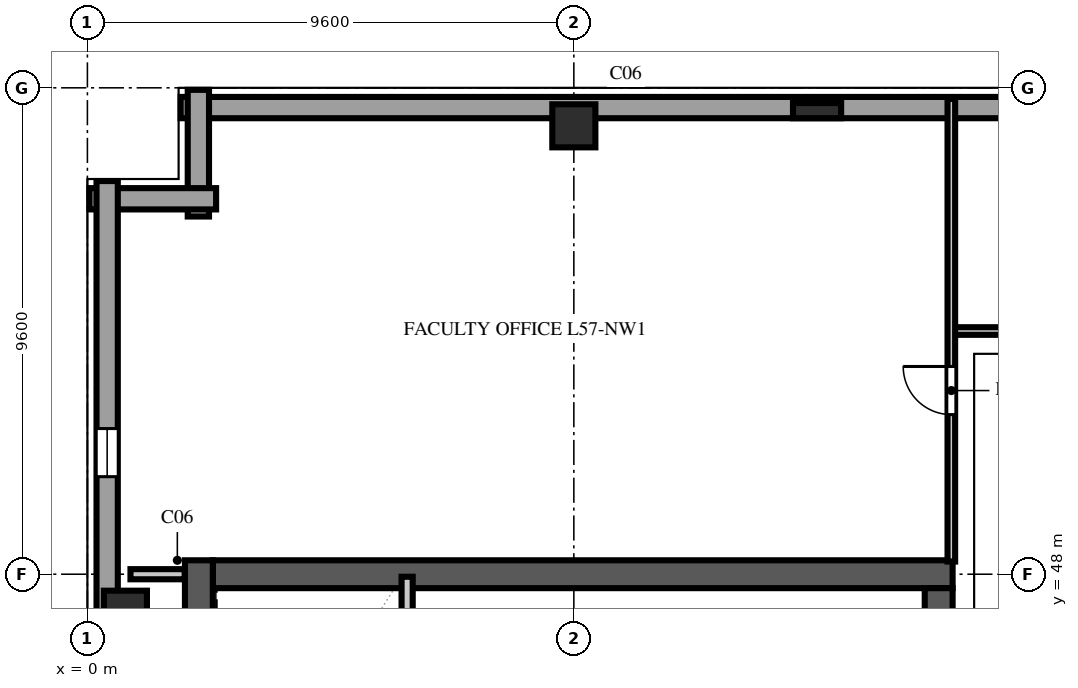
"""IFC4 building model, lengths in metres.
Left out: names, types, materials, properties, quantities, classifications, styles, units other than length and angle.
Written with IfcOpenShell. Run it as: python <this file> out.ifc"""

import sys

from ifc_helpers import new_model, si_unit, direction, frame, frame_2d, origin, origin_2d, place, context, subcontext, project, spatial, rectangle, extrude, element, fill, save


model = new_model("IFC4")
c1 = context("Model", 3, precision=1e-05, world=origin(), true_north=direction((0.0, 1.0)))
c2 = subcontext(c1, "Body", "Model", "MODEL_VIEW")
j1 = project(units=[si_unit("LENGTHUNIT", "METRE"), si_unit("PLANEANGLEUNIT", "RADIAN")], contexts=[c1])
p1 = place(None, origin())
s1 = spatial("IfcSite", under=j1, at=p1, CompositionType="ELEMENT")
p2 = place(p1, origin())
s2 = spatial("IfcBuilding", under=s1, at=p2, CompositionType="ELEMENT")
p3 = place(p2, frame((0.0, 0.0, 225.6)))
s3 = spatial("IfcBuildingStorey", under=s2, at=p3, CompositionType="ELEMENT", Elevation=225.6)
p4 = place(p3, frame((2.475, 48.0, 0.0), z_axis=(0.0, 0.0, 1.0), x_axis=(1.0, 0.0, 0.0)))
e1 = element("IfcWall", 1, at=p4, inside=s3, PredefinedType="SHEAR", context=c2, shape_type="SweptSolid", body=[
    extrude(rectangle(XDim=14.6, YDim=0.55, at=frame_2d((7.3, 0.0))), origin(), (0.0, 0.0, 1.0), 3.54),
])
p5 = place(p3, frame((2.2, 9.325, 0.0), z_axis=(0.0, 0.0, 1.0), x_axis=(0.0, 1.0, 0.0)))
e2 = element("IfcWall", 2, at=p5, inside=s3, PredefinedType="SHEAR", context=c2, shape_type="SweptSolid", body=[
    extrude(rectangle(XDim=38.95, YDim=0.55, at=frame_2d((19.475, 0.0))), origin(), (0.0, 0.0, 1.0), 3.54),
])
p6 = place(p3, frame((16.8, 36.4, 0.0), z_axis=(0.0, 0.0, 1.0), x_axis=(0.0, 1.0, 0.0)))
e3 = element("IfcWall", 3, at=p6, inside=s3, PredefinedType="SHEAR", context=c2, shape_type="SweptSolid", body=[
    extrude(rectangle(XDim=11.325, YDim=0.55, at=frame_2d((5.663, 0.0))), origin(), (0.0, 0.0, 1.0), 3.54),
])
p7 = place(p6, frame((9.2, 0.0, 0.0)))
e4 = element("IfcOpeningElement", 4, at=p7, cuts=e3, PredefinedType="OPENING", context=c2, shape_type="SweptSolid", body=[
    extrude(rectangle(XDim=0.95, YDim=2.15, at=frame_2d((0.475, 1.075))), frame((0.0, 0.287, 0.0), z_axis=(0.0, -1.0, 0.0), x_axis=(1.0, 0.0, 0.0)), (0.0, 0.0, 1.0), 0.574),
])
for number, where, z_axis, x_axis in (
    (5, (0.75, 47.25, 0.0), (0.0, 0.0, 1.0), (1.0, 0.0, 0.0)),
    (6, (9.6, 56.85, 0.0), (0.0, 0.0, 1.0), (1.0, 0.0, 0.0)),
):
    element("IfcColumn", number, at=place(p3, frame(where, z_axis=z_axis, x_axis=x_axis)), inside=s3, PredefinedType="COLUMN", context=c2, shape_type="SweptSolid", body=[
        extrude(rectangle(XDim=0.85, YDim=0.85, at=origin_2d()), origin(), (0.0, 0.0, 1.0), 3.8),
    ])
p8 = place(p3, frame((14.4, 57.15, 0.0), z_axis=(0.0, 0.0, 1.0), x_axis=(1.0, 0.0, 0.0)))
e7 = element("IfcColumn", 7, at=p8, inside=s3, PredefinedType="PILASTER", context=c2, shape_type="SweptSolid", body=[
    extrude(rectangle(XDim=0.95, YDim=0.3, at=origin_2d()), origin(), (0.0, 0.0, 1.0), 3.8),
])
p9 = place(p3, frame((36.56, 57.21, 0.0), z_axis=(0.0, 0.0, 1.0), x_axis=(-1.0, 0.0, 0.0)))
e8 = element("IfcWall", 8, at=p9, inside=s3, PredefinedType="SOLIDWALL", context=c2, shape_type="SweptSolid", body=[
    extrude(rectangle(XDim=34.72, YDim=0.42, at=frame_2d((17.36, 0.0))), origin(), (0.0, 0.0, 1.0), 3.54),
])
p10 = place(p9, frame((4.885, 0.0, 0.9)))
e9 = element("IfcOpeningElement", 9, at=p10, cuts=e8, PredefinedType="OPENING", context=c2, shape_type="SweptSolid", body=[
    extrude(rectangle(XDim=0.95, YDim=1.85, at=frame_2d((0.475, 0.925))), frame((0.0, 0.222, 0.0), z_axis=(0.0, -1.0, 0.0), x_axis=(1.0, 0.0, 0.0)), (0.0, 0.0, 1.0), 0.444),
])
p11 = place(p9, frame((9.41, 0.0, 0.9)))
e10 = element("IfcOpeningElement", 10, at=p11, cuts=e8, PredefinedType="OPENING", context=c2, shape_type="SweptSolid", body=[
    extrude(rectangle(XDim=1.5, YDim=1.85, at=frame_2d((0.75, 0.925))), frame((0.0, 0.222, 0.0), z_axis=(0.0, -1.0, 0.0), x_axis=(1.0, 0.0, 0.0)), (0.0, 0.0, 1.0), 0.444),
])
p12 = place(p9, frame((14.485, 0.0, 0.9)))
e11 = element("IfcOpeningElement", 11, at=p12, cuts=e8, PredefinedType="OPENING", context=c2, shape_type="SweptSolid", body=[
    extrude(rectangle(XDim=0.95, YDim=1.85, at=frame_2d((0.475, 0.925))), frame((0.0, 0.222, 0.0), z_axis=(0.0, -1.0, 0.0), x_axis=(1.0, 0.0, 0.0)), (0.0, 0.0, 1.0), 0.444),
])
for number, where, z_axis, x_axis in (
    (12, (2.19, 57.56, 0.0), (0.0, 0.0, 1.0), (0.0, -1.0, 0.0)),
    (13, (2.54, 55.41, 0.0), (0.0, 0.0, 1.0), (-1.0, 0.0, 0.0)),
):
    element("IfcWall", number, at=place(p3, frame(where, z_axis=z_axis, x_axis=x_axis)), inside=s3, PredefinedType="SOLIDWALL", context=c2, shape_type="SweptSolid", body=[
        extrude(rectangle(XDim=2.5, YDim=0.42, at=frame_2d((1.25, 0.0))), origin(), (0.0, 0.0, 1.0), 3.54),
    ])
p13 = place(p3, frame((0.39, 55.76, 0.0), z_axis=(0.0, 0.0, 1.0), x_axis=(0.0, -1.0, 0.0)))
e14 = element("IfcWall", 14, at=p13, inside=s3, PredefinedType="SOLIDWALL", context=c2, shape_type="SweptSolid", body=[
    extrude(rectangle(XDim=53.92, YDim=0.42, at=frame_2d((26.96, 0.0))), origin(), (0.0, 0.0, 1.0), 3.54),
])
p14 = place(p13, frame((4.885, 0.0, 0.9)))
e15 = element("IfcOpeningElement", 15, at=p14, cuts=e14, PredefinedType="OPENING", context=c2, shape_type="SweptSolid", body=[
    extrude(rectangle(XDim=0.95, YDim=1.85, at=frame_2d((0.475, 0.925))), frame((0.0, 0.222, 0.0), z_axis=(0.0, -1.0, 0.0), x_axis=(1.0, 0.0, 0.0)), (0.0, 0.0, 1.0), 0.444),
])
p15 = place(p13, frame((9.41, 0.0, 0.9)))
e16 = element("IfcOpeningElement", 16, at=p15, cuts=e14, PredefinedType="OPENING", context=c2, shape_type="SweptSolid", body=[
    extrude(rectangle(XDim=1.5, YDim=1.85, at=frame_2d((0.75, 0.925))), frame((0.0, 0.222, 0.0), z_axis=(0.0, -1.0, 0.0), x_axis=(1.0, 0.0, 0.0)), (0.0, 0.0, 1.0), 0.444),
])
p16 = place(p13, frame((14.485, 0.0, 0.9)))
e17 = element("IfcOpeningElement", 17, at=p16, cuts=e14, PredefinedType="OPENING", context=c2, shape_type="SweptSolid", body=[
    extrude(rectangle(XDim=0.95, YDim=1.85, at=frame_2d((0.475, 0.925))), frame((0.0, 0.222, 0.0), z_axis=(0.0, -1.0, 0.0), x_axis=(1.0, 0.0, 0.0)), (0.0, 0.0, 1.0), 0.444),
])
p17 = place(p13, frame((19.01, 0.0, 0.9)))
e18 = element("IfcOpeningElement", 18, at=p17, cuts=e14, PredefinedType="OPENING", context=c2, shape_type="SweptSolid", body=[
    extrude(rectangle(XDim=1.5, YDim=1.85, at=frame_2d((0.75, 0.925))), frame((0.0, 0.222, 0.0), z_axis=(0.0, -1.0, 0.0), x_axis=(1.0, 0.0, 0.0)), (0.0, 0.0, 1.0), 0.444),
])
p18 = place(p13, frame((24.085, 0.0, 0.9)))
e19 = element("IfcOpeningElement", 19, at=p18, cuts=e14, PredefinedType="OPENING", context=c2, shape_type="SweptSolid", body=[
    extrude(rectangle(XDim=0.95, YDim=1.85, at=frame_2d((0.475, 0.925))), frame((0.0, 0.222, 0.0), z_axis=(0.0, -1.0, 0.0), x_axis=(1.0, 0.0, 0.0)), (0.0, 0.0, 1.0), 0.444),
])
p19 = place(p13, frame((28.61, 0.0, 0.9)))
e20 = element("IfcOpeningElement", 20, at=p19, cuts=e14, PredefinedType="OPENING", context=c2, shape_type="SweptSolid", body=[
    extrude(rectangle(XDim=1.5, YDim=1.85, at=frame_2d((0.75, 0.925))), frame((0.0, 0.222, 0.0), z_axis=(0.0, -1.0, 0.0), x_axis=(1.0, 0.0, 0.0)), (0.0, 0.0, 1.0), 0.444),
])
p20 = place(p13, frame((33.685, 0.0, 0.9)))
e21 = element("IfcOpeningElement", 21, at=p20, cuts=e14, PredefinedType="OPENING", context=c2, shape_type="SweptSolid", body=[
    extrude(rectangle(XDim=0.95, YDim=1.85, at=frame_2d((0.475, 0.925))), frame((0.0, 0.222, 0.0), z_axis=(0.0, -1.0, 0.0), x_axis=(1.0, 0.0, 0.0)), (0.0, 0.0, 1.0), 0.444),
])
p21 = place(p13, frame((38.21, 0.0, 0.9)))
e22 = element("IfcOpeningElement", 22, at=p21, cuts=e14, PredefinedType="OPENING", context=c2, shape_type="SweptSolid", body=[
    extrude(rectangle(XDim=1.5, YDim=1.85, at=frame_2d((0.75, 0.925))), frame((0.0, 0.222, 0.0), z_axis=(0.0, -1.0, 0.0), x_axis=(1.0, 0.0, 0.0)), (0.0, 0.0, 1.0), 0.444),
])
p22 = place(p13, frame((43.285, 0.0, 0.9)))
e23 = element("IfcOpeningElement", 23, at=p22, cuts=e14, PredefinedType="OPENING", context=c2, shape_type="SweptSolid", body=[
    extrude(rectangle(XDim=0.95, YDim=1.85, at=frame_2d((0.475, 0.925))), frame((0.0, 0.222, 0.0), z_axis=(0.0, -1.0, 0.0), x_axis=(1.0, 0.0, 0.0)), (0.0, 0.0, 1.0), 0.444),
])
p23 = place(p13, frame((47.81, 0.0, 0.9)))
e24 = element("IfcOpeningElement", 24, at=p23, cuts=e14, PredefinedType="OPENING", context=c2, shape_type="SweptSolid", body=[
    extrude(rectangle(XDim=1.5, YDim=1.85, at=frame_2d((0.75, 0.925))), frame((0.0, 0.222, 0.0), z_axis=(0.0, -1.0, 0.0), x_axis=(1.0, 0.0, 0.0)), (0.0, 0.0, 1.0), 0.444),
])
p24 = place(p3, frame((6.31, 40.14, 0.0), z_axis=(0.0, 0.0, 1.0), x_axis=(0.0, 1.0, 0.0)))
e25 = element("IfcWall", 25, at=p24, inside=s3, PredefinedType="SOLIDWALL", context=c2, shape_type="SweptSolid", body=[
    extrude(rectangle(XDim=7.81, YDim=0.22, at=frame_2d((3.905, 0.0))), origin(), (0.0, 0.0, 1.0), 3.54),
])
p25 = place(p3, frame((0.85, 48.0, 0.0), z_axis=(0.0, 0.0, 1.0), x_axis=(1.0, 0.0, 0.0)))
e26 = element("IfcWall", 26, at=p25, inside=s3, PredefinedType="SOLIDWALL", context=c2, shape_type="SweptSolid", body=[
    extrude(rectangle(XDim=1.07, YDim=0.2, at=frame_2d((0.535, 0.0))), origin(), (0.0, 0.0, 1.0), 3.54),
])
p26 = place(p3, frame((17.05, 52.8, 0.0), z_axis=(0.0, 0.0, 1.0), x_axis=(1.0, 0.0, 0.0)))
e27 = element("IfcWall", 27, at=p26, inside=s3, PredefinedType="PARTITIONING", context=c2, shape_type="SweptSolid", body=[
    extrude(rectangle(XDim=2.15, YDim=0.15, at=frame_2d((1.075, 0.0))), origin(), (0.0, 0.0, 1.0), 3.54),
])
p27 = place(p3, frame((17.05, 48.25, 0.0), z_axis=(0.0, 0.0, 1.0), x_axis=(0.0, 1.0, 0.0)))
e28 = element("IfcWall", 28, at=p27, inside=s3, PredefinedType="PARTITIONING", context=c2, shape_type="SweptSolid", body=[
    extrude(rectangle(XDim=9.13, YDim=0.15, at=frame_2d((4.565, 0.0))), origin(), (0.0, 0.0, 1.0), 3.54),
])
p28 = place(p27, frame((2.9, 0.0, 0.0)))
e29 = element("IfcOpeningElement", 29, at=p28, cuts=e28, PredefinedType="OPENING", context=c2, shape_type="SweptSolid", body=[
    extrude(rectangle(XDim=0.95, YDim=2.15, at=frame_2d((0.475, 1.075))), frame((0.0, 0.087, 0.0), z_axis=(0.0, -1.0, 0.0), x_axis=(1.0, 0.0, 0.0)), (0.0, 0.0, 1.0), 0.174),
])
p29 = place(p14, origin())
e30 = element("IfcWindow", 30, at=p29, inside=s3, PartitioningType="SINGLE_PANEL", PredefinedType="WINDOW", context=c2, shape_type="SweptSolid", body=[
    extrude(rectangle(XDim=0.95, YDim=1.85, at=frame_2d((0.475, 0.925))), frame((0.0, 0.11, 0.0), z_axis=(0.0, -1.0, 0.0), x_axis=(1.0, 0.0, 0.0)), (0.0, 0.0, 1.0), 0.06),
])
fill(e15, e30)
p30 = place(p28, origin())
e31 = element("IfcDoor", 31, at=p30, inside=s3, OperationType="SINGLE_SWING_RIGHT", PredefinedType="DOOR", context=c2, shape_type="SweptSolid", body=[
    extrude(rectangle(XDim=0.95, YDim=2.15, at=frame_2d((0.475, 1.075))), frame((0.0, 0.025, 0.0), z_axis=(0.0, -1.0, 0.0), x_axis=(1.0, 0.0, 0.0)), (0.0, 0.0, 1.0), 0.05),
])
fill(e29, e31)
save(model, sys.argv[1])
